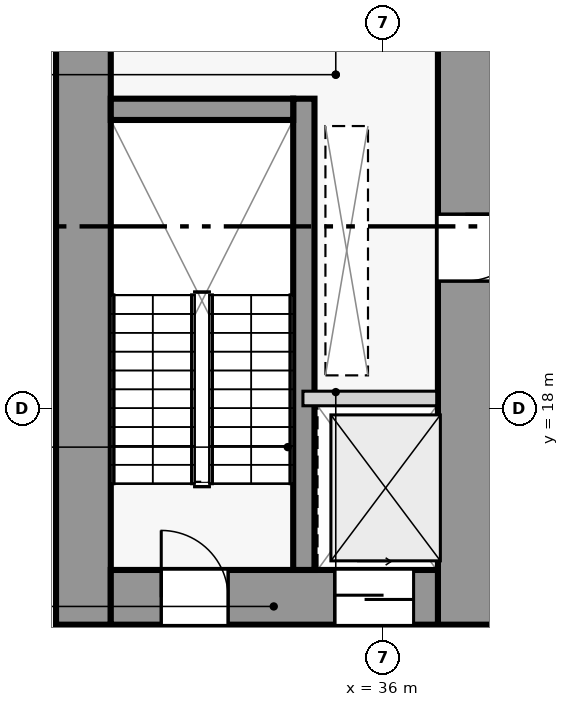
"""IFC4 building model, lengths in metres.
Left out: names, types, materials, properties, quantities, classifications, styles, units other than length and angle.
Written with IfcOpenShell. Run it as: python <this file> out.ifc"""

import sys

from ifc_helpers import new_model, si_unit, direction, frame, frame_2d, origin, place, context, subcontext, project, spatial, rectangle, extrude, source, transform, mapped, element, fill, save


model = new_model("IFC4")
c1 = context("Model", 3, precision=1e-05, world=origin(), true_north=direction((0.0, 1.0)))
c2 = subcontext(c1, "Body", "Model", "MODEL_VIEW")
j1 = project(units=[si_unit("LENGTHUNIT", "METRE"), si_unit("PLANEANGLEUNIT", "RADIAN")], contexts=[c1])
p1 = place(None, origin())
s1 = spatial("IfcSite", under=j1, at=p1, CompositionType="ELEMENT")
p2 = place(p1, origin())
s2 = spatial("IfcBuilding", under=s1, at=p2, CompositionType="ELEMENT")
p3 = place(p2, frame((0.0, 0.0, 76.5)))
s3 = spatial("IfcBuildingStorey", under=s2, at=p3, CompositionType="ELEMENT", Elevation=76.5)
p4 = place(p3, frame((31.07, 14.45, 0.0), z_axis=(0.0, 0.0, 1.0), x_axis=(0.0, 1.0, 0.0)))
e1 = element("IfcWall", 1, at=p4, inside=s3, PredefinedType="SHEAR", context=c2, shape_type="SweptSolid", body=[
    extrude(rectangle(XDim=13.15, YDim=0.9, at=frame_2d((6.575, 0.0))), origin(), (0.0, 0.0, 1.0), 7.2),
])
p5 = place(p3, frame((37.35, 14.45, 0.0), z_axis=(0.0, 0.0, 1.0), x_axis=(0.0, 1.0, 0.0)))
e2 = element("IfcWall", 2, at=p5, inside=s3, PredefinedType="SHEAR", context=c2, shape_type="SweptSolid", body=[
    extrude(rectangle(XDim=13.15, YDim=0.9, at=frame_2d((6.575, 0.0))), origin(), (0.0, 0.0, 1.0), 7.2),
])
p6 = place(p5, frame((5.65, 0.0, 0.0)))
e3 = element("IfcOpeningElement", 3, at=p6, cuts=e2, PredefinedType="OPENING", context=c2, shape_type="SweptSolid", body=[
    extrude(rectangle(XDim=1.1, YDim=2.2, at=frame_2d((0.55, 1.1))), frame((0.0, 0.46, 0.0), z_axis=(0.0, -1.0, 0.0), x_axis=(1.0, 0.0, 0.0)), (0.0, 0.0, 1.0), 0.92),
])
p7 = place(p3, frame((31.52, 14.9, 0.0), z_axis=(0.0, 0.0, 1.0), x_axis=(1.0, 0.0, 0.0)))
e4 = element("IfcWall", 4, at=p7, inside=s3, PredefinedType="SHEAR", context=c2, shape_type="SweptSolid", body=[
    extrude(rectangle(XDim=5.38, YDim=0.9, at=frame_2d((2.69, 0.0))), origin(), (0.0, 0.0, 1.0), 7.2),
])
p8 = place(p7, frame((0.83, 0.0, 0.0)))
e5 = element("IfcOpeningElement", 5, at=p8, cuts=e4, PredefinedType="OPENING", context=c2, shape_type="SweptSolid", body=[
    extrude(rectangle(XDim=1.1, YDim=2.2, at=frame_2d((0.55, 1.1))), frame((0.0, 0.46, 0.0), z_axis=(0.0, -1.0, 0.0), x_axis=(1.0, 0.0, 0.0)), (0.0, 0.0, 1.0), 0.92),
])
p9 = place(p7, frame((3.68, 0.0, 0.0)))
e6 = element("IfcOpeningElement", 6, at=p9, cuts=e4, PredefinedType="OPENING", context=c2, shape_type="SweptSolid", body=[
    extrude(rectangle(XDim=1.3, YDim=2.2, at=frame_2d((0.65, 1.1))), frame((0.0, 0.46, 0.0), z_axis=(0.0, -1.0, 0.0), x_axis=(1.0, 0.0, 0.0)), (0.0, 0.0, 1.0), 0.92),
])
p10 = place(p3, frame((34.695, 15.35, 0.0), z_axis=(0.0, 0.0, 1.0), x_axis=(0.0, 1.0, 0.0)))
e7 = element("IfcWall", 7, at=p10, inside=s3, PredefinedType="SHEAR", context=c2, shape_type="SweptSolid", body=[
    extrude(rectangle(XDim=7.75, YDim=0.35, at=frame_2d((3.875, 0.0))), origin(), (0.0, 0.0, 1.0), 7.2),
])
p11 = place(p3, frame((31.52, 22.925, 0.0), z_axis=(0.0, 0.0, 1.0), x_axis=(1.0, 0.0, 0.0)))
e8 = element("IfcWall", 8, at=p11, inside=s3, PredefinedType="SHEAR", context=c2, shape_type="SweptSolid", body=[
    extrude(rectangle(XDim=3.0, YDim=0.35, at=frame_2d((1.5, 0.0))), origin(), (0.0, 0.0, 1.0), 7.2),
])
p12 = place(p3, frame((34.68, 18.17, 0.0), z_axis=(0.0, 0.0, 1.0), x_axis=(1.0, 0.0, 0.0)))
e9 = element("IfcWall", 9, at=p12, inside=s3, PredefinedType="PARTITIONING", context=c2, shape_type="SweptSolid", body=[
    extrude(rectangle(XDim=2.2, YDim=0.24, at=frame_2d((1.1, 0.0))), origin(), (0.0, 0.0, 1.0), 6.55),
])
p13 = place(p3, frame((31.05, 11.47, 0.0), z_axis=(0.0, 0.0, 1.0), x_axis=(0.0, 1.0, 0.0)))
e10 = element("IfcWall", 10, at=p13, inside=s3, PredefinedType="PARTITIONING", context=c2, shape_type="SweptSolid", body=[
    extrude(rectangle(XDim=2.96, YDim=0.2, at=frame_2d((1.48, 0.0))), origin(), (0.0, 0.0, 1.0), 4.95),
])
p14 = place(p3, frame((37.25, 11.47, 0.0), z_axis=(0.0, 0.0, 1.0), x_axis=(0.0, 1.0, 0.0)))
e11 = element("IfcWall", 11, at=p14, inside=s3, PredefinedType="PARTITIONING", context=c2, shape_type="SweptSolid", body=[
    extrude(rectangle(XDim=2.96, YDim=0.2, at=frame_2d((1.48, 0.0))), origin(), (0.0, 0.0, 1.0), 6.55),
])
m1 = source(origin(), c2, "Body", "SweptSolid", [
    extrude(rectangle(XDim=1.1, YDim=2.2, at=frame_2d((0.55, 1.1))), frame((0.0, 0.025, 0.0), z_axis=(0.0, -1.0, 0.0), x_axis=(1.0, 0.0, 0.0)), (0.0, 0.0, 1.0), 0.05),
])
p15 = place(p8, origin())
e12 = element("IfcDoor", 12, at=p15, inside=s3, OperationType="SINGLE_SWING_LEFT", PredefinedType="DOOR", context=c2, shape_type="MappedRepresentation", body=[
    mapped(m1, transform((0.0, 0.0, 0.0), scale=1.0)),
])
fill(e5, e12)
m2 = source(origin(), c2, "Body", "SweptSolid", [
    extrude(rectangle(XDim=1.3, YDim=2.2, at=frame_2d((0.65, 1.1))), frame((0.0, 0.025, 0.0), z_axis=(0.0, -1.0, 0.0), x_axis=(1.0, 0.0, 0.0)), (0.0, 0.0, 1.0), 0.05),
])
p16 = place(p9, origin())
e13 = element("IfcDoor", 13, at=p16, inside=s3, OperationType="SLIDING_TO_RIGHT", PredefinedType="DOOR", context=c2, shape_type="MappedRepresentation", body=[
    mapped(m2, transform((0.0, 0.0, 0.0), scale=1.0)),
])
fill(e6, e13)
p17 = place(p6, frame((1.1, 0.0, 0.0), z_axis=(0.0, 0.0, 1.0), x_axis=(-1.0, 0.0, 0.0)))
e14 = element("IfcDoor", 14, at=p17, inside=s3, OperationType="SINGLE_SWING_LEFT", PredefinedType="DOOR", context=c2, shape_type="MappedRepresentation", body=[
    mapped(m1, transform((0.0, 0.0, 0.0), scale=1.0)),
])
fill(e3, e14)
save(model, sys.argv[1])
